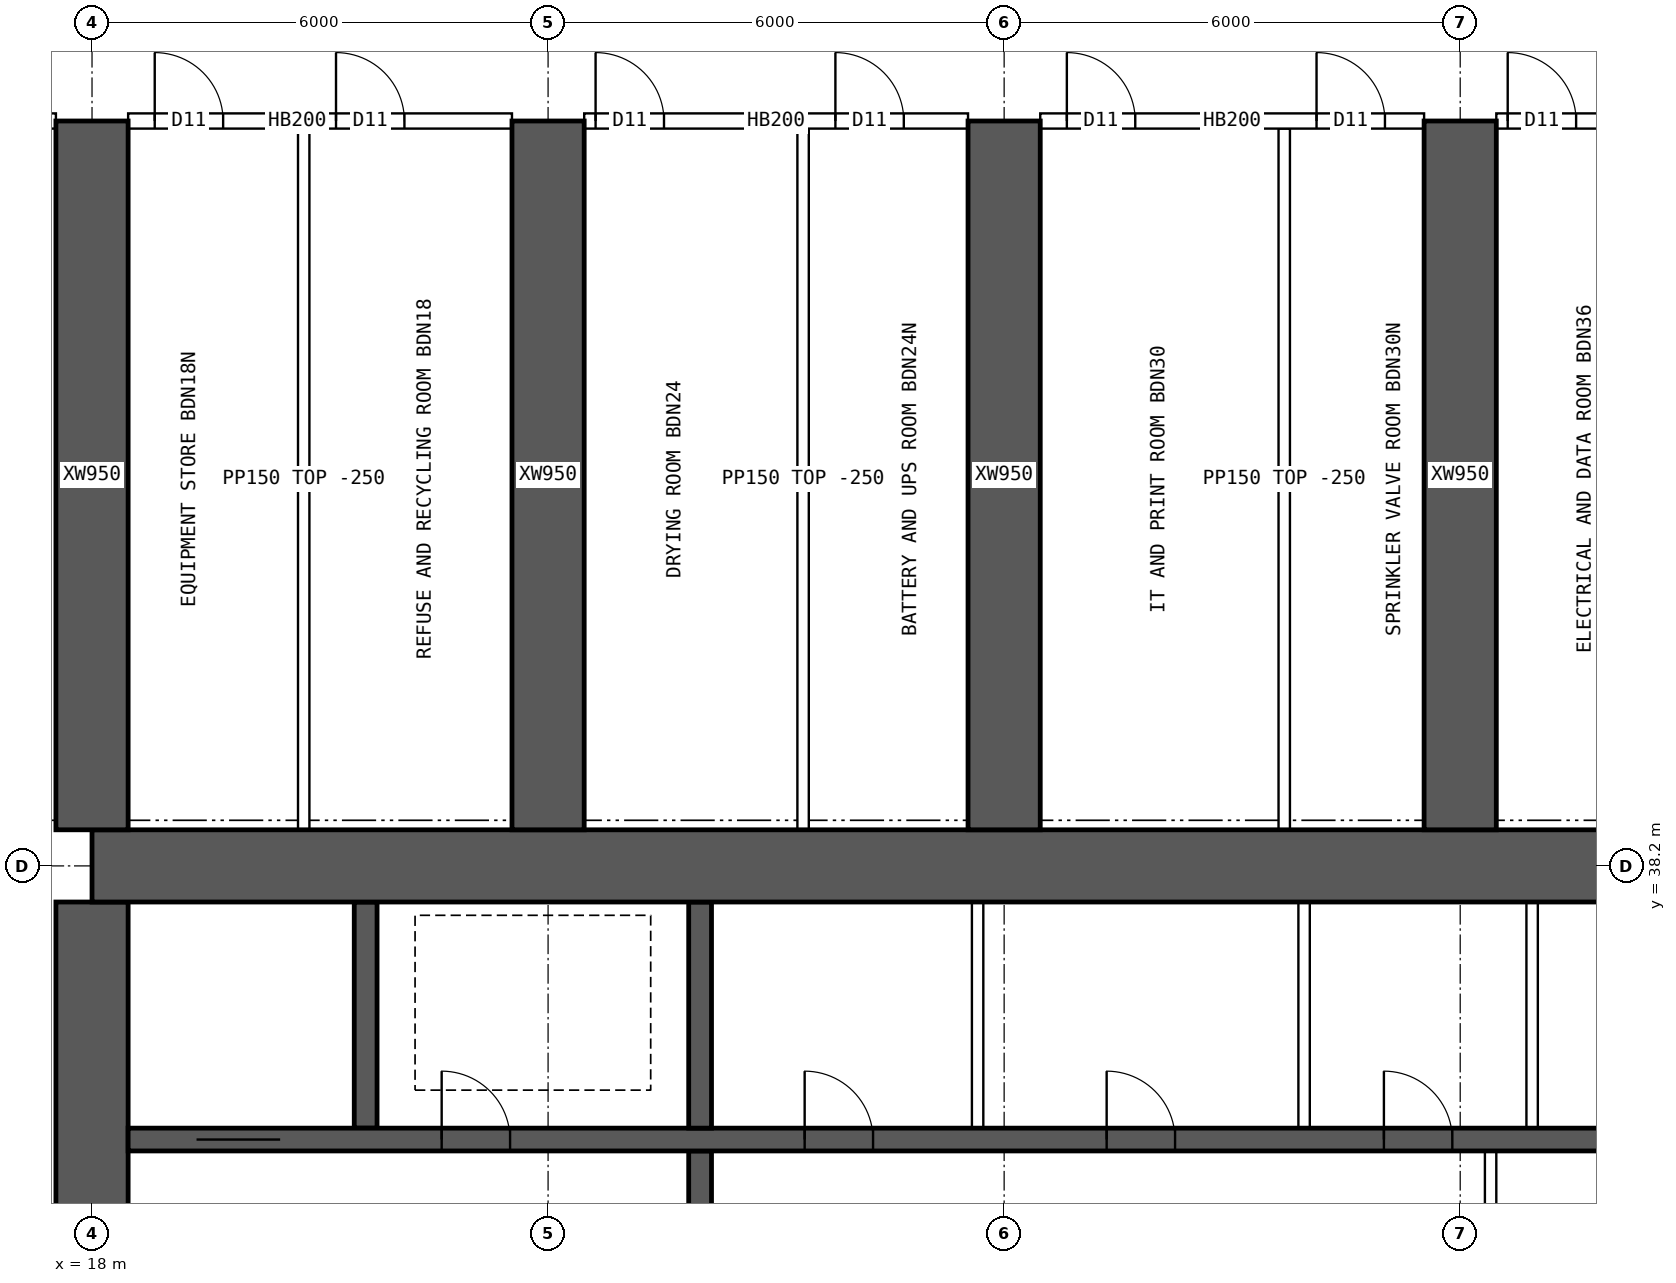
"""IFC4 building model, lengths in metres.
Left out: names, types, materials, properties, quantities, classifications, styles, units other than length and angle.
Written with IfcOpenShell. Run it as: python <this file> out.ifc"""

import sys

from ifc_helpers import new_model, si_unit, direction, frame, frame_2d, origin, place, context, subcontext, project, spatial, rectangle, extrude, element, fill, save


model = new_model("IFC4")
c1 = context("Model", 3, precision=1e-05, world=origin(), true_north=direction((0.0, 1.0)))
c2 = subcontext(c1, "Body", "Model", "MODEL_VIEW")
j1 = project(units=[si_unit("LENGTHUNIT", "METRE"), si_unit("PLANEANGLEUNIT", "RADIAN")], contexts=[c1])
p1 = place(None, origin())
s1 = spatial("IfcSite", under=j1, at=p1, CompositionType="ELEMENT")
p2 = place(p1, origin())
s2 = spatial("IfcBuilding", under=s1, at=p2, CompositionType="ELEMENT")
p3 = place(p2, frame((0.0, 0.0, 118.15)))
s3 = spatial("IfcBuildingStorey", under=s2, at=p3, CompositionType="ELEMENT", Elevation=118.15)
p4 = place(p3, frame((18.0, 38.2, 0.0), z_axis=(0.0, 0.0, 1.0), x_axis=(1.0, 0.0, 0.0)))
e1 = element("IfcWall", 1, at=p4, inside=s3, PredefinedType="SHEAR", context=c2, shape_type="SweptSolid", body=[
    extrude(rectangle(XDim=48.0, YDim=0.95, at=frame_2d((24.0, 0.0))), origin(), (0.0, 0.0, 1.0), 3.75),
])
p5 = place(p3, frame((18.0, 26.275, 0.0), z_axis=(0.0, 0.0, 1.0), x_axis=(0.0, 1.0, 0.0)))
e2 = element("IfcWall", 2, at=p5, inside=s3, PredefinedType="SHEAR", context=c2, shape_type="SweptSolid", body=[
    extrude(rectangle(XDim=11.45, YDim=0.95, at=frame_2d((5.725, 0.0))), origin(), (0.0, 0.0, 1.0), 3.75),
])
p6 = place(p5, frame((5.025, 0.0, 0.0)))
e3 = element("IfcOpeningElement", 3, at=p6, cuts=e2, PredefinedType="OPENING", context=c2, shape_type="SweptSolid", body=[
    extrude(rectangle(XDim=1.2, YDim=2.1, at=frame_2d((0.6, 1.05))), frame((0.0, 0.485, 0.0), z_axis=(0.0, -1.0, 0.0), x_axis=(1.0, 0.0, 0.0)), (0.0, 0.0, 1.0), 0.97),
])
p7 = place(p3, frame((18.475, 34.6, 0.0), z_axis=(0.0, 0.0, 1.0), x_axis=(1.0, 0.0, 0.0)))
e4 = element("IfcWall", 4, at=p7, inside=s3, PredefinedType="SHEAR", context=c2, shape_type="SweptSolid", body=[
    extrude(rectangle(XDim=47.05, YDim=0.3, at=frame_2d((23.525, 0.0))), origin(), (0.0, 0.0, 1.0), 3.75),
])
p8 = place(p7, frame((0.9, 0.0, 0.0)))
e5 = element("IfcOpeningElement", 5, at=p8, cuts=e4, PredefinedType="OPENING", context=c2, shape_type="SweptSolid", body=[
    extrude(rectangle(XDim=1.1, YDim=2.1, at=frame_2d((0.55, 1.05))), frame((0.0, 0.16, 0.0), z_axis=(0.0, -1.0, 0.0), x_axis=(1.0, 0.0, 0.0)), (0.0, 0.0, 1.0), 0.32),
])
p9 = place(p7, frame((45.05, 0.0, 0.0)))
e6 = element("IfcOpeningElement", 6, at=p9, cuts=e4, PredefinedType="OPENING", context=c2, shape_type="SweptSolid", body=[
    extrude(rectangle(XDim=1.1, YDim=2.1, at=frame_2d((0.55, 1.05))), frame((0.0, 0.16, 0.0), z_axis=(0.0, -1.0, 0.0), x_axis=(1.0, 0.0, 0.0)), (0.0, 0.0, 1.0), 0.32),
])
p10 = place(p7, frame((4.125, 0.0, 0.0)))
e7 = element("IfcOpeningElement", 7, at=p10, cuts=e4, PredefinedType="OPENING", context=c2, shape_type="SweptSolid", body=[
    extrude(rectangle(XDim=0.9, YDim=2.1, at=frame_2d((0.45, 1.05))), frame((0.0, 0.16, 0.0), z_axis=(0.0, -1.0, 0.0), x_axis=(1.0, 0.0, 0.0)), (0.0, 0.0, 1.0), 0.32),
])
p11 = place(p7, frame((42.025, 0.0, 0.0)))
e8 = element("IfcOpeningElement", 8, at=p11, cuts=e4, PredefinedType="OPENING", context=c2, shape_type="SweptSolid", body=[
    extrude(rectangle(XDim=0.9, YDim=2.1, at=frame_2d((0.45, 1.05))), frame((0.0, 0.16, 0.0), z_axis=(0.0, -1.0, 0.0), x_axis=(1.0, 0.0, 0.0)), (0.0, 0.0, 1.0), 0.32),
])
p12 = place(p7, frame((8.9, 0.0, 0.0)))
e9 = element("IfcOpeningElement", 9, at=p12, cuts=e4, PredefinedType="OPENING", context=c2, shape_type="SweptSolid", body=[
    extrude(rectangle(XDim=0.9, YDim=2.1, at=frame_2d((0.45, 1.05))), frame((0.0, 0.16, 0.0), z_axis=(0.0, -1.0, 0.0), x_axis=(1.0, 0.0, 0.0)), (0.0, 0.0, 1.0), 0.32),
])
p13 = place(p7, frame((12.874, 0.0, 0.0)))
e10 = element("IfcOpeningElement", 10, at=p13, cuts=e4, PredefinedType="OPENING", context=c2, shape_type="SweptSolid", body=[
    extrude(rectangle(XDim=0.9, YDim=2.1, at=frame_2d((0.45, 1.05))), frame((0.0, 0.16, 0.0), z_axis=(0.0, -1.0, 0.0), x_axis=(1.0, 0.0, 0.0)), (0.0, 0.0, 1.0), 0.32),
])
p14 = place(p7, frame((16.521, 0.0, 0.0)))
e11 = element("IfcOpeningElement", 11, at=p14, cuts=e4, PredefinedType="OPENING", context=c2, shape_type="SweptSolid", body=[
    extrude(rectangle(XDim=0.9, YDim=2.1, at=frame_2d((0.45, 1.05))), frame((0.0, 0.16, 0.0), z_axis=(0.0, -1.0, 0.0), x_axis=(1.0, 0.0, 0.0)), (0.0, 0.0, 1.0), 0.32),
])
p15 = place(p7, frame((20.28, 0.0, 0.0)))
e12 = element("IfcOpeningElement", 12, at=p15, cuts=e4, PredefinedType="OPENING", context=c2, shape_type="SweptSolid", body=[
    extrude(rectangle(XDim=0.9, YDim=2.1, at=frame_2d((0.45, 1.05))), frame((0.0, 0.16, 0.0), z_axis=(0.0, -1.0, 0.0), x_axis=(1.0, 0.0, 0.0)), (0.0, 0.0, 1.0), 0.32),
])
p16 = place(p7, frame((24.686, 0.0, 0.0)))
e13 = element("IfcOpeningElement", 13, at=p16, cuts=e4, PredefinedType="OPENING", context=c2, shape_type="SweptSolid", body=[
    extrude(rectangle(XDim=0.9, YDim=2.1, at=frame_2d((0.45, 1.05))), frame((0.0, 0.16, 0.0), z_axis=(0.0, -1.0, 0.0), x_axis=(1.0, 0.0, 0.0)), (0.0, 0.0, 1.0), 0.32),
])
p17 = place(p7, frame((27.483, 0.0, 0.0)))
e14 = element("IfcOpeningElement", 14, at=p17, cuts=e4, PredefinedType="OPENING", context=c2, shape_type="SweptSolid", body=[
    extrude(rectangle(XDim=0.9, YDim=2.1, at=frame_2d((0.45, 1.05))), frame((0.0, 0.16, 0.0), z_axis=(0.0, -1.0, 0.0), x_axis=(1.0, 0.0, 0.0)), (0.0, 0.0, 1.0), 0.32),
])
p18 = place(p7, frame((29.856, 0.0, 0.0)))
e15 = element("IfcOpeningElement", 15, at=p18, cuts=e4, PredefinedType="OPENING", context=c2, shape_type="SweptSolid", body=[
    extrude(rectangle(XDim=0.9, YDim=2.1, at=frame_2d((0.45, 1.05))), frame((0.0, 0.16, 0.0), z_axis=(0.0, -1.0, 0.0), x_axis=(1.0, 0.0, 0.0)), (0.0, 0.0, 1.0), 0.32),
])
p19 = place(p7, frame((33.706, 0.0, 0.0)))
e16 = element("IfcOpeningElement", 16, at=p19, cuts=e4, PredefinedType="OPENING", context=c2, shape_type="SweptSolid", body=[
    extrude(rectangle(XDim=0.9, YDim=2.1, at=frame_2d((0.45, 1.05))), frame((0.0, 0.16, 0.0), z_axis=(0.0, -1.0, 0.0), x_axis=(1.0, 0.0, 0.0)), (0.0, 0.0, 1.0), 0.32),
])
p20 = place(p7, frame((37.454, 0.0, 0.0)))
e17 = element("IfcOpeningElement", 17, at=p20, cuts=e4, PredefinedType="OPENING", context=c2, shape_type="SweptSolid", body=[
    extrude(rectangle(XDim=0.9, YDim=2.1, at=frame_2d((0.45, 1.05))), frame((0.0, 0.16, 0.0), z_axis=(0.0, -1.0, 0.0), x_axis=(1.0, 0.0, 0.0)), (0.0, 0.0, 1.0), 0.32),
])
p21 = place(p3, frame((26.0, 30.55, 0.0), z_axis=(0.0, 0.0, 1.0), x_axis=(0.0, 1.0, 0.0)))
e18 = element("IfcWall", 18, at=p21, inside=s3, PredefinedType="SHEAR", context=c2, shape_type="SweptSolid", body=[
    extrude(rectangle(XDim=3.9, YDim=0.3, at=frame_2d((1.95, 0.0))), origin(), (0.0, 0.0, 1.0), 3.75),
])
p22 = place(p21, frame((1.4, 0.0, 0.0)))
e19 = element("IfcOpeningElement", 19, at=p22, cuts=e18, PredefinedType="OPENING", context=c2, shape_type="SweptSolid", body=[
    extrude(rectangle(XDim=1.2, YDim=2.1, at=frame_2d((0.6, 1.05))), frame((0.0, 0.16, 0.0), z_axis=(0.0, -1.0, 0.0), x_axis=(1.0, 0.0, 0.0)), (0.0, 0.0, 1.0), 0.32),
])
for number, where, z_axis, x_axis in (
    (20, (21.6, 34.75, 0.0), (0.0, 0.0, 1.0), (0.0, 1.0, 0.0)),
    (21, (26.0, 34.75, 0.0), (0.0, 0.0, 1.0), (0.0, 1.0, 0.0)),
):
    element("IfcWall", number, at=place(p3, frame(where, z_axis=z_axis, x_axis=x_axis)), inside=s3, PredefinedType="SHEAR", context=c2, shape_type="SweptSolid", body=[
        extrude(rectangle(XDim=2.975, YDim=0.3, at=frame_2d((1.488, 0.0))), origin(), (0.0, 0.0, 1.0), 3.75),
    ])
for number, where, z_axis, x_axis in (
    (22, (18.0, 38.675, 0.0), (0.0, 0.0, 1.0), (0.0, 1.0, 0.0)),
    (23, (24.0, 38.675, 0.0), (0.0, 0.0, 1.0), (0.0, 1.0, 0.0)),
    (24, (30.0, 38.675, 0.0), (0.0, 0.0, 1.0), (0.0, 1.0, 0.0)),
    (25, (36.0, 38.675, 0.0), (0.0, 0.0, 1.0), (0.0, 1.0, 0.0)),
):
    element("IfcWall", number, at=place(p3, frame(where, z_axis=z_axis, x_axis=x_axis)), inside=s3, PredefinedType="SHEAR", context=c2, shape_type="SweptSolid", body=[
        extrude(rectangle(XDim=9.325, YDim=0.95, at=frame_2d((4.663, 0.0))), origin(), (0.0, 0.0, 1.0), 3.75),
    ])
p23 = place(p3, frame((36.4, 30.55, 0.0), z_axis=(0.0, 0.0, 1.0), x_axis=(0.0, 1.0, 0.0)))
e26 = element("IfcWall", 26, at=p23, inside=s3, PredefinedType="SOLIDWALL", context=c2, shape_type="SweptSolid", body=[
    extrude(rectangle(XDim=3.9, YDim=0.15, at=frame_2d((1.95, 0.0))), origin(), (0.0, 0.0, 1.0), 3.5),
])
p24 = place(p23, frame((1.15, 0.0, 0.0)))
e27 = element("IfcOpeningElement", 27, at=p24, cuts=e26, PredefinedType="OPENING", context=c2, shape_type="SweptSolid", body=[
    extrude(rectangle(XDim=1.6, YDim=2.1, at=frame_2d((0.8, 1.05))), frame((0.0, 0.085, 0.0), z_axis=(0.0, -1.0, 0.0), x_axis=(1.0, 0.0, 0.0)), (0.0, 0.0, 1.0), 0.17),
])
for number, where, z_axis, x_axis in (
    (28, (29.651, 34.75, 0.0), (0.0, 0.0, 1.0), (0.0, 1.0, 0.0)),
    (29, (33.946, 34.75, 0.0), (0.0, 0.0, 1.0), (0.0, 1.0, 0.0)),
    (30, (36.946, 34.75, 0.0), (0.0, 0.0, 1.0), (0.0, 1.0, 0.0)),
):
    element("IfcWall", number, at=place(p3, frame(where, z_axis=z_axis, x_axis=x_axis)), inside=s3, PredefinedType="SOLIDWALL", context=c2, shape_type="SweptSolid", body=[
        extrude(rectangle(XDim=2.975, YDim=0.15, at=frame_2d((1.488, 0.0))), origin(), (0.0, 0.0, 1.0), 3.5),
    ])
p25 = place(p3, frame((12.475, 48.0, 0.0), z_axis=(0.0, 0.0, 1.0), x_axis=(1.0, 0.0, 0.0)))
e31 = element("IfcWall", 31, at=p25, inside=s3, PredefinedType="SOLIDWALL", context=c2, shape_type="SweptSolid", body=[
    extrude(rectangle(XDim=5.05, YDim=0.2, at=frame_2d((2.525, 0.0))), origin(), (0.0, 0.0, 1.0), 3.5),
])
p26 = place(p25, frame((3.325, 0.0, 0.0)))
e32 = element("IfcOpeningElement", 32, at=p26, cuts=e31, PredefinedType="OPENING", context=c2, shape_type="SweptSolid", body=[
    extrude(rectangle(XDim=1.6, YDim=2.1, at=frame_2d((0.8, 1.05))), frame((0.0, 0.11, 0.0), z_axis=(0.0, -1.0, 0.0), x_axis=(1.0, 0.0, 0.0)), (0.0, 0.0, 1.0), 0.22),
])
p27 = place(p3, frame((18.475, 48.0, 0.0), z_axis=(0.0, 0.0, 1.0), x_axis=(1.0, 0.0, 0.0)))
e33 = element("IfcWall", 33, at=p27, inside=s3, PredefinedType="SOLIDWALL", context=c2, shape_type="SweptSolid", body=[
    extrude(rectangle(XDim=5.05, YDim=0.2, at=frame_2d((2.525, 0.0))), origin(), (0.0, 0.0, 1.0), 3.5),
])
p28 = place(p27, frame((0.35, 0.0, 0.0)))
e34 = element("IfcOpeningElement", 34, at=p28, cuts=e33, PredefinedType="OPENING", context=c2, shape_type="SweptSolid", body=[
    extrude(rectangle(XDim=0.9, YDim=2.1, at=frame_2d((0.45, 1.05))), frame((0.0, 0.11, 0.0), z_axis=(0.0, -1.0, 0.0), x_axis=(1.0, 0.0, 0.0)), (0.0, 0.0, 1.0), 0.22),
])
p29 = place(p27, frame((2.735, 0.0, 0.0)))
e35 = element("IfcOpeningElement", 35, at=p29, cuts=e33, PredefinedType="OPENING", context=c2, shape_type="SweptSolid", body=[
    extrude(rectangle(XDim=0.9, YDim=2.1, at=frame_2d((0.45, 1.05))), frame((0.0, 0.11, 0.0), z_axis=(0.0, -1.0, 0.0), x_axis=(1.0, 0.0, 0.0)), (0.0, 0.0, 1.0), 0.22),
])
p30 = place(p3, frame((24.475, 48.0, 0.0), z_axis=(0.0, 0.0, 1.0), x_axis=(1.0, 0.0, 0.0)))
e36 = element("IfcWall", 36, at=p30, inside=s3, PredefinedType="SOLIDWALL", context=c2, shape_type="SweptSolid", body=[
    extrude(rectangle(XDim=5.05, YDim=0.2, at=frame_2d((2.525, 0.0))), origin(), (0.0, 0.0, 1.0), 3.5),
])
p31 = place(p30, frame((0.15, 0.0, 0.0)))
e37 = element("IfcOpeningElement", 37, at=p31, cuts=e36, PredefinedType="OPENING", context=c2, shape_type="SweptSolid", body=[
    extrude(rectangle(XDim=0.9, YDim=2.1, at=frame_2d((0.45, 1.05))), frame((0.0, 0.11, 0.0), z_axis=(0.0, -1.0, 0.0), x_axis=(1.0, 0.0, 0.0)), (0.0, 0.0, 1.0), 0.22),
])
p32 = place(p30, frame((3.305, 0.0, 0.0)))
e38 = element("IfcOpeningElement", 38, at=p32, cuts=e36, PredefinedType="OPENING", context=c2, shape_type="SweptSolid", body=[
    extrude(rectangle(XDim=0.9, YDim=2.1, at=frame_2d((0.45, 1.05))), frame((0.0, 0.11, 0.0), z_axis=(0.0, -1.0, 0.0), x_axis=(1.0, 0.0, 0.0)), (0.0, 0.0, 1.0), 0.22),
])
p33 = place(p3, frame((30.475, 48.0, 0.0), z_axis=(0.0, 0.0, 1.0), x_axis=(1.0, 0.0, 0.0)))
e39 = element("IfcWall", 39, at=p33, inside=s3, PredefinedType="SOLIDWALL", context=c2, shape_type="SweptSolid", body=[
    extrude(rectangle(XDim=5.05, YDim=0.2, at=frame_2d((2.525, 0.0))), origin(), (0.0, 0.0, 1.0), 3.5),
])
p34 = place(p33, frame((0.35, 0.0, 0.0)))
e40 = element("IfcOpeningElement", 40, at=p34, cuts=e39, PredefinedType="OPENING", context=c2, shape_type="SweptSolid", body=[
    extrude(rectangle(XDim=0.9, YDim=2.1, at=frame_2d((0.45, 1.05))), frame((0.0, 0.11, 0.0), z_axis=(0.0, -1.0, 0.0), x_axis=(1.0, 0.0, 0.0)), (0.0, 0.0, 1.0), 0.22),
])
p35 = place(p33, frame((3.635, 0.0, 0.0)))
e41 = element("IfcOpeningElement", 41, at=p35, cuts=e39, PredefinedType="OPENING", context=c2, shape_type="SweptSolid", body=[
    extrude(rectangle(XDim=0.9, YDim=2.1, at=frame_2d((0.45, 1.05))), frame((0.0, 0.11, 0.0), z_axis=(0.0, -1.0, 0.0), x_axis=(1.0, 0.0, 0.0)), (0.0, 0.0, 1.0), 0.22),
])
p36 = place(p3, frame((36.475, 48.0, 0.0), z_axis=(0.0, 0.0, 1.0), x_axis=(1.0, 0.0, 0.0)))
e42 = element("IfcWall", 42, at=p36, inside=s3, PredefinedType="SOLIDWALL", context=c2, shape_type="SweptSolid", body=[
    extrude(rectangle(XDim=5.05, YDim=0.2, at=frame_2d((2.525, 0.0))), origin(), (0.0, 0.0, 1.0), 3.5),
])
p37 = place(p36, frame((0.15, 0.0, 0.0)))
e43 = element("IfcOpeningElement", 43, at=p37, cuts=e42, PredefinedType="OPENING", context=c2, shape_type="SweptSolid", body=[
    extrude(rectangle(XDim=0.9, YDim=2.1, at=frame_2d((0.45, 1.05))), frame((0.0, 0.11, 0.0), z_axis=(0.0, -1.0, 0.0), x_axis=(1.0, 0.0, 0.0)), (0.0, 0.0, 1.0), 0.22),
])
p38 = place(p36, frame((3.255, 0.0, 0.0)))
e44 = element("IfcOpeningElement", 44, at=p38, cuts=e42, PredefinedType="OPENING", context=c2, shape_type="SweptSolid", body=[
    extrude(rectangle(XDim=0.9, YDim=2.1, at=frame_2d((0.45, 1.05))), frame((0.0, 0.11, 0.0), z_axis=(0.0, -1.0, 0.0), x_axis=(1.0, 0.0, 0.0)), (0.0, 0.0, 1.0), 0.22),
])
for number, where, z_axis, x_axis in (
    (45, (20.785, 38.675, 0.0), (0.0, 0.0, 1.0), (0.0, 1.0, 0.0)),
    (46, (27.355, 38.675, 0.0), (0.0, 0.0, 1.0), (0.0, 1.0, 0.0)),
    (47, (33.685, 38.675, 0.0), (0.0, 0.0, 1.0), (0.0, 1.0, 0.0)),
):
    element("IfcWall", number, at=place(p3, frame(where, z_axis=z_axis, x_axis=x_axis)), inside=s3, PredefinedType="PARTITIONING", context=c2, shape_type="SweptSolid", body=[
        extrude(rectangle(XDim=9.225, YDim=0.15, at=frame_2d((4.612, 0.0))), origin(), (0.0, 0.0, 1.0), 3.5),
    ])
p39 = place(p8, origin())
e48 = element("IfcDoor", 48, at=p39, inside=s3, OperationType="DOUBLE_DOOR_SLIDING", PredefinedType="DOOR", context=c2, shape_type="SweptSolid", body=[
    extrude(rectangle(XDim=1.1, YDim=2.1, at=frame_2d((0.55, 1.05))), frame((0.0, 0.025, 0.0), z_axis=(0.0, -1.0, 0.0), x_axis=(1.0, 0.0, 0.0)), (0.0, 0.0, 1.0), 0.05),
])
fill(e5, e48)
p40 = place(p10, origin())
e49 = element("IfcDoor", 49, at=p40, inside=s3, OperationType="SINGLE_SWING_LEFT", PredefinedType="DOOR", context=c2, shape_type="SweptSolid", body=[
    extrude(rectangle(XDim=0.9, YDim=2.1, at=frame_2d((0.45, 1.05))), frame((0.0, 0.025, 0.0), z_axis=(0.0, -1.0, 0.0), x_axis=(1.0, 0.0, 0.0)), (0.0, 0.0, 1.0), 0.05),
])
fill(e7, e49)
p41 = place(p12, origin())
e50 = element("IfcDoor", 50, at=p41, inside=s3, OperationType="SINGLE_SWING_LEFT", PredefinedType="DOOR", context=c2, shape_type="SweptSolid", body=[
    extrude(rectangle(XDim=0.9, YDim=2.1, at=frame_2d((0.45, 1.05))), frame((0.0, 0.025, 0.0), z_axis=(0.0, -1.0, 0.0), x_axis=(1.0, 0.0, 0.0)), (0.0, 0.0, 1.0), 0.05),
])
fill(e9, e50)
p42 = place(p13, origin())
e51 = element("IfcDoor", 51, at=p42, inside=s3, OperationType="SINGLE_SWING_LEFT", PredefinedType="DOOR", context=c2, shape_type="SweptSolid", body=[
    extrude(rectangle(XDim=0.9, YDim=2.1, at=frame_2d((0.45, 1.05))), frame((0.0, 0.025, 0.0), z_axis=(0.0, -1.0, 0.0), x_axis=(1.0, 0.0, 0.0)), (0.0, 0.0, 1.0), 0.05),
])
fill(e10, e51)
p43 = place(p14, origin())
e52 = element("IfcDoor", 52, at=p43, inside=s3, OperationType="SINGLE_SWING_LEFT", PredefinedType="DOOR", context=c2, shape_type="SweptSolid", body=[
    extrude(rectangle(XDim=0.9, YDim=2.1, at=frame_2d((0.45, 1.05))), frame((0.0, 0.025, 0.0), z_axis=(0.0, -1.0, 0.0), x_axis=(1.0, 0.0, 0.0)), (0.0, 0.0, 1.0), 0.05),
])
fill(e11, e52)
p44 = place(p28, origin())
e53 = element("IfcDoor", 53, at=p44, inside=s3, OperationType="SINGLE_SWING_LEFT", PredefinedType="DOOR", context=c2, shape_type="SweptSolid", body=[
    extrude(rectangle(XDim=0.9, YDim=2.1, at=frame_2d((0.45, 1.05))), frame((0.0, 0.025, 0.0), z_axis=(0.0, -1.0, 0.0), x_axis=(1.0, 0.0, 0.0)), (0.0, 0.0, 1.0), 0.05),
])
fill(e34, e53)
p45 = place(p29, origin())
e54 = element("IfcDoor", 54, at=p45, inside=s3, OperationType="SINGLE_SWING_LEFT", PredefinedType="DOOR", context=c2, shape_type="SweptSolid", body=[
    extrude(rectangle(XDim=0.9, YDim=2.1, at=frame_2d((0.45, 1.05))), frame((0.0, 0.025, 0.0), z_axis=(0.0, -1.0, 0.0), x_axis=(1.0, 0.0, 0.0)), (0.0, 0.0, 1.0), 0.05),
])
fill(e35, e54)
p46 = place(p31, origin())
e55 = element("IfcDoor", 55, at=p46, inside=s3, OperationType="SINGLE_SWING_LEFT", PredefinedType="DOOR", context=c2, shape_type="SweptSolid", body=[
    extrude(rectangle(XDim=0.9, YDim=2.1, at=frame_2d((0.45, 1.05))), frame((0.0, 0.025, 0.0), z_axis=(0.0, -1.0, 0.0), x_axis=(1.0, 0.0, 0.0)), (0.0, 0.0, 1.0), 0.05),
])
fill(e37, e55)
p47 = place(p32, origin())
e56 = element("IfcDoor", 56, at=p47, inside=s3, OperationType="SINGLE_SWING_LEFT", PredefinedType="DOOR", context=c2, shape_type="SweptSolid", body=[
    extrude(rectangle(XDim=0.9, YDim=2.1, at=frame_2d((0.45, 1.05))), frame((0.0, 0.025, 0.0), z_axis=(0.0, -1.0, 0.0), x_axis=(1.0, 0.0, 0.0)), (0.0, 0.0, 1.0), 0.05),
])
fill(e38, e56)
p48 = place(p34, origin())
e57 = element("IfcDoor", 57, at=p48, inside=s3, OperationType="SINGLE_SWING_LEFT", PredefinedType="DOOR", context=c2, shape_type="SweptSolid", body=[
    extrude(rectangle(XDim=0.9, YDim=2.1, at=frame_2d((0.45, 1.05))), frame((0.0, 0.025, 0.0), z_axis=(0.0, -1.0, 0.0), x_axis=(1.0, 0.0, 0.0)), (0.0, 0.0, 1.0), 0.05),
])
fill(e40, e57)
p49 = place(p35, origin())
e58 = element("IfcDoor", 58, at=p49, inside=s3, OperationType="SINGLE_SWING_LEFT", PredefinedType="DOOR", context=c2, shape_type="SweptSolid", body=[
    extrude(rectangle(XDim=0.9, YDim=2.1, at=frame_2d((0.45, 1.05))), frame((0.0, 0.025, 0.0), z_axis=(0.0, -1.0, 0.0), x_axis=(1.0, 0.0, 0.0)), (0.0, 0.0, 1.0), 0.05),
])
fill(e41, e58)
p50 = place(p37, origin())
e59 = element("IfcDoor", 59, at=p50, inside=s3, OperationType="SINGLE_SWING_LEFT", PredefinedType="DOOR", context=c2, shape_type="SweptSolid", body=[
    extrude(rectangle(XDim=0.9, YDim=2.1, at=frame_2d((0.45, 1.05))), frame((0.0, 0.025, 0.0), z_axis=(0.0, -1.0, 0.0), x_axis=(1.0, 0.0, 0.0)), (0.0, 0.0, 1.0), 0.05),
])
fill(e43, e59)
save(model, sys.argv[1])
